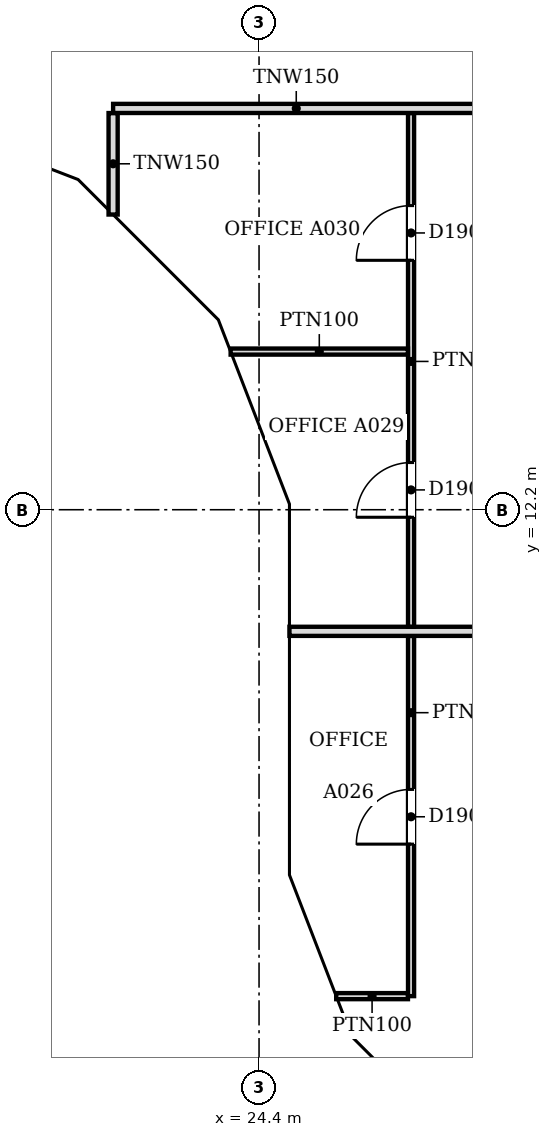
"""IFC4 building model, lengths in metres.
Left out: names, types, materials, properties, quantities, classifications, styles, units other than length and angle.
Written with IfcOpenShell. Run it as: python <this file> out.ifc"""

import sys

from ifc_helpers import new_model, si_unit, direction, frame, frame_2d, origin, place, context, subcontext, project, spatial, polyline, rectangle, outline, extrude, faceted_brep, source, transform, mapped, element, fill, save


model = new_model("IFC4")
c1 = context("Model", 3, precision=1e-05, world=origin(), true_north=direction((0.0, 1.0)))
c2 = subcontext(c1, "Body", "Model", "MODEL_VIEW")
j1 = project(units=[si_unit("LENGTHUNIT", "METRE"), si_unit("PLANEANGLEUNIT", "RADIAN")], contexts=[c1])
p1 = place(None, origin())
s1 = spatial("IfcSite", under=j1, at=p1, CompositionType="ELEMENT")
p2 = place(p1, origin())
s2 = spatial("IfcBuilding", under=s1, at=p2, CompositionType="ELEMENT")
p3 = place(p2, frame((0.0, 0.0, 146.8)))
s3 = spatial("IfcBuildingStorey", under=s2, at=p3, CompositionType="ELEMENT", Elevation=146.8)
m1 = source(origin(), c2, "Body", "Brep", [
    faceted_brep([(3.096, -0.25, 7.536), (0.047, -0.25, 3.856), (0.047, -0.25, 3.744), (3.096, -0.25, 0.064), (0.0, 0.25, 3.8), (3.149, 0.25, 7.6), (3.202, 0.25, 7.536), (3.202, 0.25, 0.064), (3.149, 0.25, 0.0), (3.149, -0.0, 0.0), (3.149, -0.0, 7.6), (0.0, 0.0, 3.8)], [[[0, 1, 2, 3]], [[4, 5, 6, 7, 8]], [[8, 7, 9]], [[6, 5, 10]], [[5, 4, 11, 1, 0, 10]], [[4, 8, 9, 3, 2, 11]], [[11, 2, 1]], [[3, 9, 7, 6, 10, 0]]]),
])
p4 = place(p3, frame((18.346, 18.55, -3.8), z_axis=(0.0, 0.0, 1.0), x_axis=(0.932985567668, -0.359913782069, 0.0)))
e1 = element("IfcWall", 1, at=p4, inside=s3, PredefinedType="SOLIDWALL", context=c2, shape_type="MappedRepresentation", body=[
    mapped(m1, transform((0.0, 0.0, 0.0), scale=1.0)),
])
m2 = source(origin(), c2, "Body", "SweptSolid", [
    extrude(outline(polyline([(2.949, 6.967), (0.325, 3.8), (2.949, 0.633), (2.949, 6.967)])), frame((0.0, 0.26, 0.0), z_axis=(0.0, -1.0, 0.0), x_axis=(1.0, 0.0, 0.0)), (0.0, 0.0, 1.0), 0.52),
])
p5 = place(p4, origin())
e2 = element("IfcOpeningElement", 2, at=p5, cuts=e1, PredefinedType="OPENING", context=c2, shape_type="MappedRepresentation", body=[
    mapped(m2, transform((0.0, 0.0, 0.0), scale=1.0)),
])
m3 = source(origin(), c2, "Body", "Brep", [
    faceted_brep([(0.106, -0.25, 0.064), (3.156, -0.25, 3.736), (3.156, -0.25, 3.864), (0.106, -0.25, 7.536), (0.0, 0.25, 7.536), (0.053, 0.25, 7.6), (3.209, 0.25, 3.8), (0.053, 0.25, 0.0), (0.0, 0.25, 0.064), (3.209, -0.0, 3.8), (0.053, 0.0, 0.0), (0.053, 0.0, 7.6)], [[[0, 1, 2, 3]], [[4, 5, 6, 7, 8]], [[7, 6, 9, 1, 0, 10]], [[6, 5, 11, 3, 2, 9]], [[5, 4, 11]], [[8, 7, 10]], [[8, 10, 0, 3, 11, 4]], [[1, 9, 2]]]),
])
p6 = place(p3, frame((21.248, 17.454, -3.8), z_axis=(0.0, 0.0, 1.0), x_axis=(0.707106781187, -0.707106781187, 0.0)))
e3 = element("IfcWall", 3, at=p6, inside=s3, PredefinedType="SOLIDWALL", context=c2, shape_type="MappedRepresentation", body=[
    mapped(m3, transform((0.0, 0.0, 0.0), scale=1.0)),
])
m4 = source(origin(), c2, "Body", "SweptSolid", [
    extrude(outline(polyline([(0.253, 0.632), (2.884, 3.8), (0.253, 6.968), (0.253, 0.632)])), frame((0.0, 0.26, 0.0), z_axis=(0.0, -1.0, 0.0), x_axis=(1.0, 0.0, 0.0)), (0.0, 0.0, 1.0), 0.52),
])
p7 = place(p6, origin())
e4 = element("IfcOpeningElement", 4, at=p7, cuts=e3, PredefinedType="OPENING", context=c2, shape_type="MappedRepresentation", body=[
    mapped(m4, transform((0.0, 0.0, 0.0), scale=1.0)),
])
m5 = source(origin(), c2, "Body", "Brep", [
    faceted_brep([(3.103, -0.25, 7.544), (0.053, -0.25, 3.864), (0.053, -0.25, 3.736), (3.103, -0.25, 0.056), (0.0, 0.25, 3.8), (3.149, 0.25, 7.6), (3.196, 0.25, 7.543), (3.196, 0.25, 0.057), (3.149, 0.25, 0.0), (3.149, -0.0, 0.0), (3.149, -0.0, 7.6), (0.0, 0.0, 3.8)], [[[0, 1, 2, 3]], [[4, 5, 6, 7, 8]], [[8, 7, 9]], [[6, 5, 10]], [[5, 4, 11, 1, 0, 10]], [[4, 8, 9, 3, 2, 11]], [[11, 2, 1]], [[3, 9, 7, 6, 10, 0]]]),
])
p8 = place(p3, frame((23.517, 15.185, -3.8), z_axis=(0.0, 0.0, 1.0), x_axis=(0.359864468756, -0.933004589553, 0.0)))
e5 = element("IfcWall", 5, at=p8, inside=s3, PredefinedType="SOLIDWALL", context=c2, shape_type="MappedRepresentation", body=[
    mapped(m5, transform((0.0, 0.0, 0.0), scale=1.0)),
])
p9 = place(p8, origin())
e6 = element("IfcOpeningElement", 6, at=p9, cuts=e5, PredefinedType="OPENING", context=c2, shape_type="MappedRepresentation", body=[
    mapped(m2, transform((0.0, 0.0, 0.0), scale=1.0)),
])
m6 = source(origin(), c2, "Body", "Brep", [
    faceted_brep([(0.093, -0.25, 0.057), (3.143, -0.25, 3.8), (0.093, -0.25, 7.543), (0.0, 0.25, 7.544), (0.047, 0.25, 7.6), (3.143, 0.25, 3.8), (0.047, 0.25, 0.0), (0.0, 0.25, 0.056), (0.047, 0.0, 0.0), (0.047, 0.0, 7.6)], [[[0, 1, 2]], [[3, 4, 5, 6, 7]], [[6, 5, 1, 0, 8]], [[5, 4, 9, 2, 1]], [[4, 3, 9]], [[7, 6, 8]], [[7, 8, 0, 2, 9, 3]]]),
])
p10 = place(p3, frame((24.65, 12.293, -3.8), z_axis=(0.0, 0.0, 1.0), x_axis=(0.0, -1.0, 0.0)))
e7 = element("IfcWall", 7, at=p10, inside=s3, PredefinedType="SOLIDWALL", context=c2, shape_type="MappedRepresentation", body=[
    mapped(m6, transform((0.0, 0.0, 0.0), scale=1.0)),
])
m7 = source(origin(), c2, "Body", "SweptSolid", [
    extrude(outline(polyline([(0.247, 0.641), (2.821, 3.8), (0.247, 6.959), (0.247, 0.641)])), frame((0.0, 0.26, 0.0), z_axis=(0.0, -1.0, 0.0), x_axis=(1.0, 0.0, 0.0)), (0.0, 0.0, 1.0), 0.52),
])
p11 = place(p10, origin())
e8 = element("IfcOpeningElement", 8, at=p11, cuts=e7, PredefinedType="OPENING", context=c2, shape_type="MappedRepresentation", body=[
    mapped(m7, transform((0.0, 0.0, 0.0), scale=1.0)),
])
m8 = source(origin(), c2, "Body", "Brep", [
    faceted_brep([(3.003, -0.25, 0.0), (3.05, -0.25, 0.06), (3.05, -0.25, 7.54), (3.003, -0.25, 7.6), (0.0, -0.25, 3.8), (0.0, 0.25, 3.8), (2.957, 0.25, 7.541), (2.957, 0.25, 0.059), (3.003, 0.0, 0.0), (3.003, 0.0, 7.6)], [[[0, 1, 2, 3, 4]], [[5, 6, 7]], [[1, 0, 8]], [[9, 3, 2]], [[6, 5, 4, 3, 9]], [[5, 7, 8, 0, 4]], [[1, 8, 7, 6, 9, 2]]]),
])
p12 = place(p3, frame((24.65, 9.15, -3.8), z_axis=(0.0, 0.0, 1.0), x_axis=(0.0, -1.0, 0.0)))
e9 = element("IfcWall", 9, at=p12, inside=s3, PredefinedType="SOLIDWALL", context=c2, shape_type="MappedRepresentation", body=[
    mapped(m8, transform((0.0, 0.0, 0.0), scale=1.0)),
])
m9 = source(origin(), c2, "Body", "SweptSolid", [
    extrude(outline(polyline([(2.803, 6.944), (0.319, 3.8), (2.803, 0.656), (2.803, 6.944)])), frame((0.0, 0.26, 0.0), z_axis=(0.0, -1.0, 0.0), x_axis=(1.0, 0.0, 0.0)), (0.0, 0.0, 1.0), 0.52),
])
p13 = place(p12, origin())
e10 = element("IfcOpeningElement", 10, at=p13, cuts=e9, PredefinedType="OPENING", context=c2, shape_type="MappedRepresentation", body=[
    mapped(m9, transform((0.0, 0.0, 0.0), scale=1.0)),
])
m10 = source(origin(), c2, "Body", "Brep", [
    faceted_brep([(0.047, -0.25, 0.0), (2.997, -0.25, 3.8), (0.047, -0.25, 7.6), (0.0, -0.25, 7.541), (0.0, -0.25, 0.059), (0.093, 0.25, 7.54), (2.944, 0.25, 3.868), (2.944, 0.25, 3.732), (0.093, 0.25, 0.06), (2.997, 0.0, 3.8), (0.047, 0.0, 0.0), (0.047, 0.0, 7.6)], [[[0, 1, 2, 3, 4]], [[5, 6, 7, 8]], [[8, 7, 9, 1, 0, 10]], [[6, 5, 11, 2, 1, 9]], [[3, 2, 11]], [[10, 0, 4]], [[8, 10, 4, 3, 11, 5]], [[9, 7, 6]]]),
])
p14 = place(p3, frame((24.633, 6.19, -3.8), z_axis=(0.0, 0.0, 1.0), x_axis=(0.359901446078, -0.932990326376, 0.0)))
e11 = element("IfcWall", 11, at=p14, inside=s3, PredefinedType="SOLIDWALL", context=c2, shape_type="MappedRepresentation", body=[
    mapped(m10, transform((0.0, 0.0, 0.0), scale=1.0)),
])
m11 = source(origin(), c2, "Body", "SweptSolid", [
    extrude(outline(polyline([(0.247, 0.665), (2.681, 3.8), (0.247, 6.935), (0.247, 0.665)])), frame((0.0, 0.26, 0.0), z_axis=(0.0, -1.0, 0.0), x_axis=(1.0, 0.0, 0.0)), (0.0, 0.0, 1.0), 0.52),
])
p15 = place(p14, origin())
e12 = element("IfcOpeningElement", 12, at=p15, cuts=e11, PredefinedType="OPENING", context=c2, shape_type="MappedRepresentation", body=[
    mapped(m11, transform((0.0, 0.0, 0.0), scale=1.0)),
])
m12 = source(origin(), c2, "Body", "Brep", [
    faceted_brep([(2.944, -0.25, 0.0), (2.997, -0.25, 0.068), (2.997, -0.25, 7.532), (2.944, -0.25, 7.6), (0.0, -0.25, 3.8), (0.053, 0.25, 3.868), (2.891, 0.25, 7.532), (2.891, 0.25, 0.068), (0.053, 0.25, 3.732), (2.944, 0.0, 0.0), (2.944, 0.0, 7.6), (0.0, 0.0, 3.8)], [[[0, 1, 2, 3, 4]], [[5, 6, 7, 8]], [[1, 0, 9]], [[10, 3, 2]], [[6, 5, 11, 4, 3, 10]], [[8, 7, 9, 0, 4, 11]], [[8, 11, 5]], [[1, 9, 7, 6, 10, 2]]]),
])
p16 = place(p3, frame((25.712, 3.394, -3.8), z_axis=(0.0, 0.0, 1.0), x_axis=(0.707066050402, -0.707147509625, 0.0)))
e13 = element("IfcWall", 13, at=p16, inside=s3, PredefinedType="SOLIDWALL", context=c2, shape_type="MappedRepresentation", body=[
    mapped(m12, transform((0.0, 0.0, 0.0), scale=1.0)),
])
m13 = source(origin(), c2, "Body", "SweptSolid", [
    extrude(outline(polyline([(2.744, 6.934), (0.316, 3.8), (2.744, 0.666), (2.744, 6.934)])), frame((0.0, 0.26, 0.0), z_axis=(0.0, -1.0, 0.0), x_axis=(1.0, 0.0, 0.0)), (0.0, 0.0, 1.0), 0.52),
])
p17 = place(p16, origin())
e14 = element("IfcOpeningElement", 14, at=p17, cuts=e13, PredefinedType="OPENING", context=c2, shape_type="MappedRepresentation", body=[
    mapped(m13, transform((0.0, 0.0, 0.0), scale=1.0)),
])
m14 = source(origin(), c2, "Body", "Brep", [
    faceted_brep([(0.093, -0.25, 0.056), (3.143, -0.25, 3.736), (3.143, -0.25, 3.8), (0.093, -0.25, 3.8), (0.0, 0.25, 3.8), (3.196, 0.25, 3.8), (0.047, 0.25, 0.0), (0.0, 0.25, 0.057), (3.196, -0.0, 3.8), (0.047, 0.0, 0.0)], [[[0, 1, 2, 3]], [[4, 5, 6, 7]], [[6, 5, 8, 1, 0, 9]], [[5, 4, 3, 2, 8]], [[7, 6, 9]], [[7, 9, 0, 3, 4]], [[1, 8, 2]]]),
])
p18 = place(p3, frame((18.303, 18.567, 0.0), z_axis=(0.0, 0.0, 1.0), x_axis=(0.932978940178, -0.359930961693, 0.0)))
e15 = element("IfcWall", 15, at=p18, inside=s3, PredefinedType="SOLIDWALL", context=c2, shape_type="MappedRepresentation", body=[
    mapped(m14, transform((0.0, 0.0, 0.0), scale=1.0)),
])
m15 = source(origin(), c2, "Body", "SweptSolid", [
    extrude(outline(polyline([(0.247, 0.633), (2.664, 3.55), (0.247, 3.55), (0.247, 0.633)])), frame((0.0, 0.26, 0.0), z_axis=(0.0, -1.0, 0.0), x_axis=(1.0, 0.0, 0.0)), (0.0, 0.0, 1.0), 0.52),
])
p19 = place(p18, origin())
e16 = element("IfcOpeningElement", 16, at=p19, cuts=e15, PredefinedType="OPENING", context=c2, shape_type="MappedRepresentation", body=[
    mapped(m15, transform((0.0, 0.0, 0.0), scale=1.0)),
])
m16 = source(origin(), c2, "Body", "Brep", [
    faceted_brep([(3.103, -0.25, 3.8), (0.053, -0.25, 3.8), (0.053, -0.25, 3.736), (3.103, -0.25, 0.064), (0.0, 0.25, 3.8), (3.209, 0.25, 3.8), (3.209, 0.25, 0.064), (3.156, 0.25, 0.0), (3.156, -0.0, 0.0), (0.0, 0.0, 3.8)], [[[0, 1, 2, 3]], [[4, 5, 6, 7]], [[7, 6, 8]], [[5, 4, 9, 1, 0]], [[4, 7, 8, 3, 2, 9]], [[2, 1, 9]], [[3, 8, 6, 5, 0]]]),
])
p20 = place(p3, frame((21.285, 17.417, 0.0), z_axis=(0.0, 0.0, 1.0), x_axis=(0.707106781187, -0.707106781187, 0.0)))
e17 = element("IfcWall", 17, at=p20, inside=s3, PredefinedType="SOLIDWALL", context=c2, shape_type="MappedRepresentation", body=[
    mapped(m16, transform((0.0, 0.0, 0.0), scale=1.0)),
])
m17 = source(origin(), c2, "Body", "SweptSolid", [
    extrude(outline(polyline([(2.956, 3.55), (0.533, 3.55), (2.956, 0.632), (2.956, 3.55)])), frame((0.0, 0.26, 0.0), z_axis=(0.0, -1.0, 0.0), x_axis=(1.0, 0.0, 0.0)), (0.0, 0.0, 1.0), 0.52),
])
p21 = place(p20, origin())
e18 = element("IfcOpeningElement", 18, at=p21, cuts=e17, PredefinedType="OPENING", context=c2, shape_type="MappedRepresentation", body=[
    mapped(m17, transform((0.0, 0.0, 0.0), scale=1.0)),
])
m18 = source(origin(), c2, "Body", "Brep", [
    faceted_brep([(0.106, -0.25, 0.064), (3.156, -0.25, 3.744), (3.156, -0.25, 3.8), (0.106, -0.25, 3.8), (0.0, 0.25, 3.8), (3.202, 0.25, 3.8), (0.053, 0.25, 0.0), (0.0, 0.25, 0.064), (3.202, -0.0, 3.8), (0.053, 0.0, 0.0)], [[[0, 1, 2, 3]], [[4, 5, 6, 7]], [[6, 5, 8, 1, 0, 9]], [[5, 4, 3, 2, 8]], [[7, 6, 9]], [[7, 9, 0, 3, 4]], [[1, 8, 2]]]),
])
p22 = place(p3, frame((23.497, 15.234, 0.0), z_axis=(0.0, 0.0, 1.0), x_axis=(0.359913782069, -0.932985567668, 0.0)))
e19 = element("IfcWall", 19, at=p22, inside=s3, PredefinedType="SOLIDWALL", context=c2, shape_type="MappedRepresentation", body=[
    mapped(m18, transform((0.0, 0.0, 0.0), scale=1.0)),
])
m19 = source(origin(), c2, "Body", "SweptSolid", [
    extrude(outline(polyline([(0.253, 0.633), (2.671, 3.55), (0.253, 3.55), (0.253, 0.633)])), frame((0.0, 0.26, 0.0), z_axis=(0.0, -1.0, 0.0), x_axis=(1.0, 0.0, 0.0)), (0.0, 0.0, 1.0), 0.52),
])
p23 = place(p22, origin())
e20 = element("IfcOpeningElement", 20, at=p23, cuts=e19, PredefinedType="OPENING", context=c2, shape_type="MappedRepresentation", body=[
    mapped(m19, transform((0.0, 0.0, 0.0), scale=1.0)),
])
m20 = source(origin(), c2, "Body", "Brep", [
    faceted_brep([(3.096, -0.25, 0.0), (6.1, -0.25, 3.8), (0.047, -0.25, 3.8), (0.047, -0.25, 3.743), (0.0, 0.25, 3.8), (6.053, 0.25, 3.8), (6.053, 0.25, 3.741), (3.096, 0.25, 0.0), (6.1, -0.0, 3.8), (0.0, 0.0, 3.8)], [[[0, 1, 2, 3]], [[4, 5, 6, 7]], [[7, 6, 8, 1, 0]], [[5, 4, 9, 2, 1, 8]], [[4, 7, 0, 3, 9]], [[3, 2, 9]], [[6, 5, 8]]]),
])
p24 = place(p3, frame((24.65, 12.247, 0.0), z_axis=(0.0, 0.0, 1.0), x_axis=(0.0, -1.0, 0.0)))
e21 = element("IfcWall", 21, at=p24, inside=s3, PredefinedType="SOLIDWALL", context=c2, shape_type="MappedRepresentation", body=[
    mapped(m20, transform((0.0, 0.0, 0.0), scale=1.0)),
])
m21 = source(origin(), c2, "Body", "SweptSolid", [
    extrude(outline(polyline([(3.094, 0.399), (5.584, 3.55), (0.526, 3.55), (3.094, 0.399)])), frame((0.0, 0.26, 0.0), z_axis=(0.0, -1.0, 0.0), x_axis=(1.0, 0.0, 0.0)), (0.0, 0.0, 1.0), 0.52),
])
p25 = place(p24, origin())
e22 = element("IfcOpeningElement", 22, at=p25, cuts=e21, PredefinedType="OPENING", context=c2, shape_type="MappedRepresentation", body=[
    mapped(m21, transform((0.0, 0.0, 0.0), scale=1.0)),
])
m22 = source(origin(), c2, "Body", "Brep", [
    faceted_brep([(2.95, -0.25, 0.0), (3.003, -0.25, 0.068), (3.003, -0.25, 3.8), (0.0, -0.25, 3.8), (0.047, 0.25, 3.8), (2.898, 0.25, 3.8), (2.898, 0.25, 0.068), (0.047, 0.25, 3.74), (2.95, 0.0, 0.0), (0.0, 0.0, 3.8)], [[[0, 1, 2, 3]], [[4, 5, 6, 7]], [[1, 0, 8]], [[5, 4, 9, 3, 2]], [[7, 6, 8, 0, 3, 9]], [[7, 9, 4]], [[1, 8, 6, 5, 2]]]),
])
p26 = place(p3, frame((24.65, 6.146, 0.0), z_axis=(0.0, 0.0, 1.0), x_axis=(0.359953949349, -0.932970071518, 0.0)))
e23 = element("IfcWall", 23, at=p26, inside=s3, PredefinedType="SOLIDWALL", context=c2, shape_type="MappedRepresentation", body=[
    mapped(m22, transform((0.0, 0.0, 0.0), scale=1.0)),
])
m23 = source(origin(), c2, "Body", "SweptSolid", [
    extrude(outline(polyline([(2.75, 3.55), (0.511, 3.55), (2.75, 0.665), (2.75, 3.55)])), frame((0.0, 0.26, 0.0), z_axis=(0.0, -1.0, 0.0), x_axis=(1.0, 0.0, 0.0)), (0.0, 0.0, 1.0), 0.52),
])
p27 = place(p26, origin())
e24 = element("IfcOpeningElement", 24, at=p27, cuts=e23, PredefinedType="OPENING", context=c2, shape_type="MappedRepresentation", body=[
    mapped(m23, transform((0.0, 0.0, 0.0), scale=1.0)),
])
m24 = source(origin(), c2, "Body", "Brep", [
    faceted_brep([(0.053, -0.25, 0.0), (2.997, -0.25, 3.8), (0.0, -0.25, 3.8), (0.0, -0.25, 0.068), (0.106, 0.25, 3.8), (2.944, 0.25, 3.8), (2.944, 0.25, 3.732), (0.106, 0.25, 0.068), (2.997, 0.0, 3.8), (0.053, 0.0, 0.0)], [[[0, 1, 2, 3]], [[4, 5, 6, 7]], [[7, 6, 8, 1, 0, 9]], [[5, 4, 2, 1, 8]], [[9, 0, 3]], [[7, 9, 3, 2, 4]], [[6, 5, 8]]]),
])
p28 = place(p3, frame((25.675, 3.431, 0.0), z_axis=(0.0, 0.0, 1.0), x_axis=(0.707106781187, -0.707106781187, 0.0)))
e25 = element("IfcWall", 25, at=p28, inside=s3, PredefinedType="SOLIDWALL", context=c2, shape_type="MappedRepresentation", body=[
    mapped(m24, transform((0.0, 0.0, 0.0), scale=1.0)),
])
m25 = source(origin(), c2, "Body", "SweptSolid", [
    extrude(outline(polyline([(0.253, 0.666), (2.487, 3.55), (0.253, 3.55), (0.253, 0.666)])), frame((0.0, 0.26, 0.0), z_axis=(0.0, -1.0, 0.0), x_axis=(1.0, 0.0, 0.0)), (0.0, 0.0, 1.0), 0.52),
])
p29 = place(p28, origin())
e26 = element("IfcOpeningElement", 26, at=p29, cuts=e25, PredefinedType="OPENING", context=c2, shape_type="MappedRepresentation", body=[
    mapped(m25, transform((0.0, 0.0, 0.0), scale=1.0)),
])
p30 = place(p3, frame((25.669, 4.2, 0.0), z_axis=(0.0, 0.0, 1.0), x_axis=(1.0, 0.0, 0.0)))
e27 = element("IfcWall", 27, at=p30, inside=s3, PredefinedType="PARTITIONING", context=c2, shape_type="SweptSolid", body=[
    extrude(rectangle(XDim=1.18, YDim=0.1, at=frame_2d((0.59, 0.0))), origin(), (0.0, 0.0, 1.0), 2.888),
])
p31 = place(p3, frame((26.9, 4.2, 0.0), z_axis=(0.0, 0.0, 1.0), x_axis=(0.0, 1.0, 0.0)))
e28 = element("IfcWall", 28, at=p31, inside=s3, PredefinedType="PARTITIONING", context=c2, shape_type="SweptSolid", body=[
    extrude(rectangle(XDim=5.924, YDim=0.1, at=frame_2d((2.962, 0.0))), origin(), (0.0, 0.0, 1.0), 2.888),
])
m26 = source(origin(), c2, "Body", "SweptSolid", [
    extrude(rectangle(XDim=0.9, YDim=2.1, at=frame_2d((0.45, 1.05))), frame((0.0, 0.06, 0.0), z_axis=(0.0, -1.0, 0.0), x_axis=(1.0, 0.0, 0.0)), (0.0, 0.0, 1.0), 0.12),
])
p32 = place(p31, frame((2.5, 0.0, 0.0)))
e29 = element("IfcOpeningElement", 29, at=p32, cuts=e28, PredefinedType="OPENING", context=c2, shape_type="MappedRepresentation", body=[
    mapped(m26, transform((0.0, 0.0, 0.0), scale=1.0)),
])
p33 = place(p3, frame((24.9, 10.2, 0.0), z_axis=(0.0, 0.0, 1.0), x_axis=(1.0, 0.0, 0.0)))
e30 = element("IfcWall", 30, at=p33, inside=s3, PredefinedType="PARTITIONING", context=c2, shape_type="SweptSolid", body=[
    extrude(rectangle(XDim=15.9, YDim=0.15, at=frame_2d((7.95, 0.0))), origin(), (0.0, 0.0, 1.0), 2.888),
])
p34 = place(p3, frame((26.9, 10.276, 0.0), z_axis=(0.0, 0.0, 1.0), x_axis=(0.0, 1.0, 0.0)))
e31 = element("IfcWall", 31, at=p34, inside=s3, PredefinedType="PARTITIONING", context=c2, shape_type="SweptSolid", body=[
    extrude(rectangle(XDim=8.448, YDim=0.1, at=frame_2d((4.224, 0.0))), origin(), (0.0, 0.0, 1.0), 2.888),
])
p35 = place(p34, frame((6.026, 0.0, 0.0)))
e32 = element("IfcOpeningElement", 32, at=p35, cuts=e31, PredefinedType="OPENING", context=c2, shape_type="MappedRepresentation", body=[
    mapped(m26, transform((0.0, 0.0, 0.0), scale=1.0)),
])
p36 = place(p34, frame((1.8, 0.0, 0.0)))
e33 = element("IfcOpeningElement", 33, at=p36, cuts=e31, PredefinedType="OPENING", context=c2, shape_type="MappedRepresentation", body=[
    mapped(m26, transform((0.0, 0.0, 0.0), scale=1.0)),
])
p37 = place(p3, frame((23.933, 14.801, 0.0), z_axis=(0.0, 0.0, 1.0), x_axis=(1.0, 0.0, 0.0)))
e34 = element("IfcWall", 34, at=p37, inside=s3, PredefinedType="PARTITIONING", context=c2, shape_type="SweptSolid", body=[
    extrude(rectangle(XDim=2.917, YDim=0.1, at=frame_2d((1.458, 0.0))), origin(), (0.0, 0.0, 1.0), 2.888),
])
p38 = place(p3, frame((22.0, 17.055, 0.0), z_axis=(0.0, 0.0, 1.0), x_axis=(0.0, 1.0, 0.0)))
e35 = element("IfcWall", 35, at=p38, inside=s3, PredefinedType="PARTITIONING", context=c2, shape_type="SweptSolid", body=[
    extrude(rectangle(XDim=1.669, YDim=0.15, at=frame_2d((0.834, 0.0))), origin(), (0.0, 0.0, 1.0), 2.888),
])
p39 = place(p3, frame((22.0, 18.8, 0.0), z_axis=(0.0, 0.0, 1.0), x_axis=(1.0, 0.0, 0.0)))
e36 = element("IfcWall", 36, at=p39, inside=s3, PredefinedType="PARTITIONING", context=c2, shape_type="SweptSolid", body=[
    extrude(rectangle(XDim=6.024, YDim=0.15, at=frame_2d((3.012, 0.0))), origin(), (0.0, 0.0, 1.0), 2.888),
])
m27 = source(origin(), c2, "Body", "SweptSolid", [
    extrude(rectangle(XDim=0.9, YDim=2.1, at=frame_2d((0.45, 1.05))), frame((0.0, 0.025, 0.0), z_axis=(0.0, -1.0, 0.0), x_axis=(1.0, 0.0, 0.0)), (0.0, 0.0, 1.0), 0.05),
])
p40 = place(p35, origin())
e37 = element("IfcDoor", 37, at=p40, inside=s3, OperationType="SINGLE_SWING_LEFT", PredefinedType="DOOR", context=c2, shape_type="MappedRepresentation", body=[
    mapped(m27, transform((0.0, 0.0, 0.0), scale=1.0)),
])
fill(e32, e37)
p41 = place(p36, origin())
e38 = element("IfcDoor", 38, at=p41, inside=s3, OperationType="SINGLE_SWING_LEFT", PredefinedType="DOOR", context=c2, shape_type="MappedRepresentation", body=[
    mapped(m27, transform((0.0, 0.0, 0.0), scale=1.0)),
])
fill(e33, e38)
p42 = place(p32, origin())
e39 = element("IfcDoor", 39, at=p42, inside=s3, OperationType="SINGLE_SWING_LEFT", PredefinedType="DOOR", context=c2, shape_type="MappedRepresentation", body=[
    mapped(m27, transform((0.0, 0.0, 0.0), scale=1.0)),
])
fill(e29, e39)
save(model, sys.argv[1])
